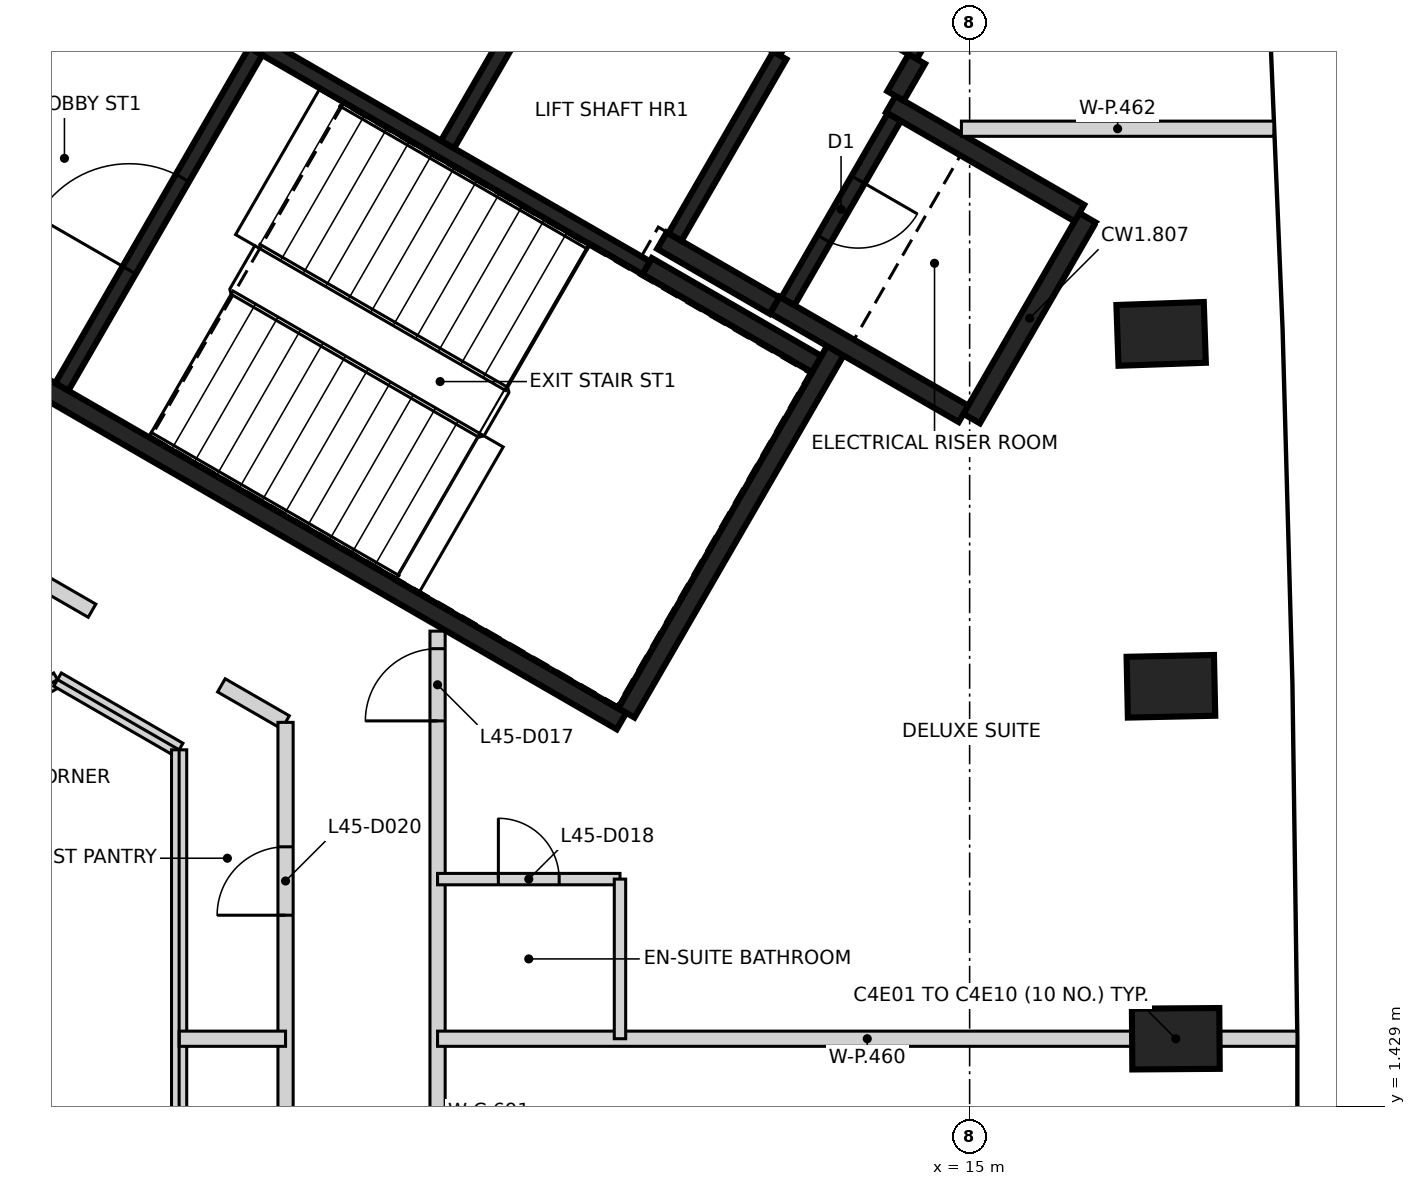
"""IFC4 building model, lengths in metres.
Left out: names, types, materials, properties, quantities, classifications, styles, units other than length and angle.
Written with IfcOpenShell. Run it as: python <this file> out.ifc"""

import sys

from ifc_helpers import new_model, si_unit, direction, frame, frame_2d, origin, origin_2d, place, context, subcontext, project, spatial, rectangle, extrude, element, fill, save


model = new_model("IFC4")
c1 = context("Model", 3, precision=1e-05, world=origin(), true_north=direction((0.0, 1.0)))
c2 = subcontext(c1, "Body", "Model", "MODEL_VIEW")
j1 = project(units=[si_unit("LENGTHUNIT", "METRE"), si_unit("PLANEANGLEUNIT", "RADIAN")], contexts=[c1])
p1 = place(None, origin())
s1 = spatial("IfcSite", under=j1, at=p1, CompositionType="ELEMENT")
p2 = place(p1, origin())
s2 = spatial("IfcBuilding", under=s1, at=p2, CompositionType="ELEMENT")
p3 = place(p2, frame((0.0, 0.0, 182.8)))
s3 = spatial("IfcBuildingStorey", under=s2, at=p3, CompositionType="ELEMENT", Elevation=182.8)
for number, where, z_axis, x_axis in (
    (1, (17.712, 2.319, -0.35), (0.0, 0.0, 1.0), (1.0, 0.007, 0.0)),
    (2, (17.648, 6.956, -0.35), (0.0, 0.0, 1.0), (1.0, 0.021, 0.0)),
    (3, (17.519, 11.592, -0.35), (0.0, 0.0, 1.0), (0.999, 0.034, 0.0)),
):
    element("IfcColumn", number, at=place(p3, frame(where, z_axis=z_axis, x_axis=x_axis)), inside=s3, PredefinedType="COLUMN", context=c2, shape_type="SweptSolid", body=[
        extrude(rectangle(XDim=1.15, YDim=0.8, at=origin_2d()), origin(), (0.0, 0.0, 1.0), 3.6),
    ])
p4 = place(p3, frame((10.42, 6.498, 0.0), z_axis=(0.0, 0.0, 1.0), x_axis=(-0.866021906294, 0.500006057782, 0.0)))
e4 = element("IfcWall", 4, at=p4, inside=s3, PredefinedType="SHEAR", context=c2, shape_type="SweptSolid", body=[
    extrude(rectangle(XDim=11.55, YDim=0.25, at=frame_2d((5.775, 0.0))), origin(), (0.0, 0.0, 1.0), 3.25),
])
p5 = place(p4, frame((10.025, 0.0, 0.0)))
e5 = element("IfcOpeningElement", 5, at=p5, cuts=e4, PredefinedType="OPENING", context=c2, shape_type="SweptSolid", body=[
    extrude(rectangle(XDim=1.2, YDim=2.1, at=frame_2d((0.6, 1.05))), frame((0.0, 0.135, 0.0), z_axis=(0.0, -1.0, 0.0), x_axis=(1.0, 0.0, 0.0)), (0.0, 0.0, 1.0), 0.27),
])
p6 = place(p4, frame((8.725, 0.0, 0.0)))
e6 = element("IfcOpeningElement", 6, at=p6, cuts=e4, PredefinedType="OPENING", context=c2, shape_type="SweptSolid", body=[
    extrude(rectangle(XDim=1.2, YDim=2.1, at=frame_2d((0.6, 1.05))), frame((0.0, 0.135, 0.0), z_axis=(0.0, -1.0, 0.0), x_axis=(1.0, 0.0, 0.0)), (0.0, 0.0, 1.0), 0.27),
])
p7 = place(p3, frame((0.48, 12.381, 0.0), z_axis=(0.0, 0.0, 1.0), x_axis=(0.49999885962, 0.866026062182, 0.0)))
e7 = element("IfcWall", 7, at=p7, inside=s3, PredefinedType="SHEAR", context=c2, shape_type="SweptSolid", body=[
    extrude(rectangle(XDim=5.225, YDim=0.25, at=frame_2d((2.612, 0.0))), origin(), (0.0, 0.0, 1.0), 3.25),
])
p8 = place(p3, frame((13.238, 11.378, 0.0), z_axis=(0.0, 0.0, 1.0), x_axis=(-0.500008851346, -0.866020293397, 0.0)))
e8 = element("IfcWall", 8, at=p8, inside=s3, PredefinedType="SHEAR", context=c2, shape_type="SweptSolid", body=[
    extrude(rectangle(XDim=5.51, YDim=0.25, at=frame_2d((2.755, 0.0))), origin(), (0.0, 0.0, 1.0), 3.25),
])
p9 = place(p3, frame((16.552, 13.119, 0.0), z_axis=(0.0, 0.0, 1.0), x_axis=(-0.499978833458, -0.866037623948, 0.0)))
e9 = element("IfcWall", 9, at=p9, inside=s3, PredefinedType="SHEAR", context=c2, shape_type="SweptSolid", body=[
    extrude(rectangle(XDim=3.05, YDim=0.25, at=frame_2d((1.525, 0.0))), origin(), (0.0, 0.0, 1.0), 3.25),
])
p10 = place(p3, frame((14.918, 10.54, 0.0), z_axis=(0.0, 0.0, 1.0), x_axis=(-0.866063538972, 0.499933942099, 0.0)))
e10 = element("IfcWall", 10, at=p10, inside=s3, PredefinedType="SHEAR", context=c2, shape_type="SweptSolid", body=[
    extrude(rectangle(XDim=2.865, YDim=0.25, at=frame_2d((1.432, 0.0))), origin(), (0.0, 0.0, 1.0), 3.25),
])
p11 = place(p3, frame((13.963, 14.614, 0.0), z_axis=(0.0, 0.0, 1.0), x_axis=(0.866042235819, -0.499970844928, 0.0)))
e11 = element("IfcWall", 11, at=p11, inside=s3, PredefinedType="SHEAR", context=c2, shape_type="SweptSolid", body=[
    extrude(rectangle(XDim=2.865, YDim=0.25, at=frame_2d((1.432, 0.0))), origin(), (0.0, 0.0, 1.0), 3.25),
])
p12 = place(p3, frame((10.757, 12.481, 0.0), z_axis=(0.0, 0.0, 1.0), x_axis=(0.866022940537, -0.500004266446, 0.0)))
e12 = element("IfcWall", 12, at=p12, inside=s3, PredefinedType="SHEAR", context=c2, shape_type="SweptSolid", body=[
    extrude(rectangle(XDim=2.575, YDim=0.25, at=frame_2d((1.287, 0.0))), origin(), (0.0, 0.0, 1.0), 3.25),
])
p13 = place(p3, frame((12.433, 11.964, 0.0), z_axis=(0.0, 0.0, 1.0), x_axis=(-0.866038183914, 0.499977863513, 0.0)))
e13 = element("IfcWall", 13, at=p13, inside=s3, PredefinedType="SHEAR", context=c2, shape_type="SweptSolid", body=[
    extrude(rectangle(XDim=1.71, YDim=0.25, at=frame_2d((0.855, 0.0))), origin(), (0.0, 0.0, 1.0), 3.25),
])
p14 = place(p3, frame((12.995, 16.108, 0.0), z_axis=(0.0, 0.0, 1.0), x_axis=(0.866044474677, -0.49996696679, 0.0)))
e14 = element("IfcWall", 14, at=p14, inside=s3, PredefinedType="SHEAR", context=c2, shape_type="SweptSolid", body=[
    extrude(rectangle(XDim=1.584, YDim=0.25, at=frame_2d((0.792, 0.0))), origin(), (0.0, 0.0, 1.0), 3.25),
])
p15 = place(p3, frame((14.305, 15.207, 0.0), z_axis=(0.0, 0.0, 1.0), x_axis=(-0.499848422343, -0.866112899501, 0.0)))
e15 = element("IfcWall", 15, at=p15, inside=s3, PredefinedType="SHEAR", context=c2, shape_type="SweptSolid", body=[
    extrude(rectangle(XDim=0.559, YDim=0.25, at=frame_2d((0.28, 0.0))), origin(), (0.0, 0.0, 1.0), 3.25),
])
p16 = place(p3, frame((12.552, 15.342, 0.0), z_axis=(0.0, 0.0, 1.0), x_axis=(-0.866030299012, 0.499991521122, 0.0)))
e16 = element("IfcWall", 16, at=p16, inside=s3, PredefinedType="SHEAR", context=c2, shape_type="SweptSolid", body=[
    extrude(rectangle(XDim=6.1, YDim=0.2, at=frame_2d((3.05, 0.0))), origin(), (0.0, 0.0, 1.0), 3.25),
])
p17 = place(p16, frame((1.0, 0.0, 0.0)))
e17 = element("IfcOpeningElement", 17, at=p17, cuts=e16, PredefinedType="OPENING", context=c2, shape_type="SweptSolid", body=[
    extrude(rectangle(XDim=1.2, YDim=2.1, at=frame_2d((0.6, 1.05))), frame((0.0, 0.11, 0.0), z_axis=(0.0, -1.0, 0.0), x_axis=(1.0, 0.0, 0.0)), (0.0, 0.0, 1.0), 0.22),
])
p18 = place(p16, frame((3.982, 0.0, 0.0)))
e18 = element("IfcOpeningElement", 18, at=p18, cuts=e16, PredefinedType="OPENING", context=c2, shape_type="SweptSolid", body=[
    extrude(rectangle(XDim=1.2, YDim=2.1, at=frame_2d((0.6, 1.05))), frame((0.0, 0.11, 0.0), z_axis=(0.0, -1.0, 0.0), x_axis=(1.0, 0.0, 0.0)), (0.0, 0.0, 1.0), 0.22),
])
p19 = place(p3, frame((10.743, 12.46, 0.0), z_axis=(0.0, 0.0, 1.0), x_axis=(-0.866018848283, 0.500011354289, 0.0)))
e19 = element("IfcWall", 19, at=p19, inside=s3, PredefinedType="SHEAR", context=c2, shape_type="SweptSolid", body=[
    extrude(rectangle(XDim=5.974, YDim=0.2, at=frame_2d((2.987, 0.0))), origin(), (0.0, 0.0, 1.0), 3.25),
])
p20 = place(p3, frame((3.057, 10.895, 0.0), z_axis=(0.0, 0.0, 1.0), x_axis=(0.500027839223, 0.866009330205, 0.0)))
e20 = element("IfcWall", 20, at=p20, inside=s3, PredefinedType="SHEAR", context=c2, shape_type="SweptSolid", body=[
    extrude(rectangle(XDim=5.098, YDim=0.2, at=frame_2d((2.549, 0.0))), origin(), (0.0, 0.0, 1.0), 3.25),
])
p21 = place(p20, frame((1.774, 0.0, 0.0)))
e21 = element("IfcOpeningElement", 21, at=p21, cuts=e20, PredefinedType="OPENING", context=c2, shape_type="SweptSolid", body=[
    extrude(rectangle(XDim=1.4, YDim=2.1, at=frame_2d((0.7, 1.05))), frame((0.0, 0.11, 0.0), z_axis=(0.0, -1.0, 0.0), x_axis=(1.0, 0.0, 0.0)), (0.0, 0.0, 1.0), 0.22),
])
p22 = place(p3, frame((8.132, 14.084, 0.0), z_axis=(0.0, 0.0, 1.0), x_axis=(0.500030834389, 0.86600760081, 0.0)))
e22 = element("IfcWall", 22, at=p22, inside=s3, PredefinedType="SHEAR", context=c2, shape_type="SweptSolid", body=[
    extrude(rectangle(XDim=3.198, YDim=0.2, at=frame_2d((1.599, 0.0))), origin(), (0.0, 0.0, 1.0), 3.25),
])
p23 = place(p3, frame((14.008, 14.442, 0.0), z_axis=(0.0, 0.0, 1.0), x_axis=(-0.499986818241, -0.866033014143, 0.0)))
e23 = element("IfcWall", 23, at=p23, inside=s3, PredefinedType="SHEAR", context=c2, shape_type="SweptSolid", body=[
    extrude(rectangle(XDim=2.798, YDim=0.2, at=frame_2d((1.399, 0.0))), origin(), (0.0, 0.0, 1.0), 3.25),
])
p24 = place(p23, frame((0.949, 0.0, 0.0)))
e24 = element("IfcOpeningElement", 24, at=p24, cuts=e23, PredefinedType="OPENING", context=c2, shape_type="SweptSolid", body=[
    extrude(rectangle(XDim=0.9, YDim=2.1, at=frame_2d((0.45, 1.05))), frame((0.0, 0.11, 0.0), z_axis=(0.0, -1.0, 0.0), x_axis=(1.0, 0.0, 0.0)), (0.0, 0.0, 1.0), 0.22),
])
p25 = place(p3, frame((12.502, 15.255, 0.0), z_axis=(0.0, 0.0, 1.0), x_axis=(-0.499965018551, -0.866045599391, 0.0)))
e25 = element("IfcWall", 25, at=p25, inside=s3, PredefinedType="SHEAR", context=c2, shape_type="SweptSolid", body=[
    extrude(rectangle(XDim=2.759, YDim=0.2, at=frame_2d((1.379, 0.0))), origin(), (0.0, 0.0, 1.0), 3.25),
])
p26 = place(p3, frame((-1.084, 12.65, 0.0), z_axis=(0.0, 0.0, 1.0), x_axis=(0.492271892014, 0.870441488173, 0.0)))
e26 = element("IfcWall", 26, at=p26, inside=s3, PredefinedType="PARTITIONING", context=c2, shape_type="SweptSolid", body=[
    extrude(rectangle(XDim=10.531, YDim=0.2, at=frame_2d((5.266, 0.0))), origin(), (0.0, 0.0, 1.0), 3.25),
])
p27 = place(p26, frame((4.161, 0.0, 0.0)))
e27 = element("IfcOpeningElement", 27, at=p27, cuts=e26, PredefinedType="OPENING", context=c2, shape_type="SweptSolid", body=[
    extrude(rectangle(XDim=0.95, YDim=2.1, at=frame_2d((0.475, 1.05))), frame((0.0, 0.11, 0.0), z_axis=(0.0, -1.0, 0.0), x_axis=(1.0, 0.0, 0.0)), (0.0, 0.0, 1.0), 0.22),
])
p28 = place(p3, frame((2.612, 8.436, 0.0), z_axis=(0.0, 0.0, 1.0), x_axis=(0.866055964107, -0.499947064232, 0.0)))
e28 = element("IfcWall", 28, at=p28, inside=s3, PredefinedType="PARTITIONING", context=c2, shape_type="SweptSolid", body=[
    extrude(rectangle(XDim=0.972, YDim=0.2, at=frame_2d((0.486, 0.0))), origin(), (0.0, 0.0, 1.0), 3.25),
])
p29 = place(p3, frame((5.156, 6.968, 0.0), z_axis=(0.0, 0.0, 1.0), x_axis=(0.866123013327, -0.49983089719, 0.0)))
e29 = element("IfcWall", 29, at=p29, inside=s3, PredefinedType="PARTITIONING", context=c2, shape_type="SweptSolid", body=[
    extrude(rectangle(XDim=0.974, YDim=0.2, at=frame_2d((0.487, 0.0))), origin(), (0.0, 0.0, 1.0), 3.25),
])
p30 = place(p3, frame((6.0, -6.481, 0.0), z_axis=(0.0, 0.0, 1.0), x_axis=(0.0, 1.0, 0.0)))
e30 = element("IfcWall", 30, at=p30, inside=s3, PredefinedType="PARTITIONING", context=c2, shape_type="SweptSolid", body=[
    extrude(rectangle(XDim=12.962, YDim=0.2, at=frame_2d((6.481, 0.0))), origin(), (0.0, 0.0, 1.0), 3.25),
])
p31 = place(p30, frame((3.956, 0.0, 0.0)))
e31 = element("IfcOpeningElement", 31, at=p31, cuts=e30, PredefinedType="OPENING", context=c2, shape_type="SweptSolid", body=[
    extrude(rectangle(XDim=0.9, YDim=2.1, at=frame_2d((0.45, 1.05))), frame((0.0, 0.11, 0.0), z_axis=(0.0, -1.0, 0.0), x_axis=(1.0, 0.0, 0.0)), (0.0, 0.0, 1.0), 0.22),
])
p32 = place(p30, frame((10.425, 0.0, 0.0)))
e32 = element("IfcOpeningElement", 32, at=p32, cuts=e30, PredefinedType="OPENING", context=c2, shape_type="SweptSolid", body=[
    extrude(rectangle(XDim=0.9, YDim=2.1, at=frame_2d((0.45, 1.05))), frame((0.0, 0.11, 0.0), z_axis=(0.0, -1.0, 0.0), x_axis=(1.0, 0.0, 0.0)), (0.0, 0.0, 1.0), 0.22),
])
p33 = place(p3, frame((8.0, -4.966, 0.0), z_axis=(0.0, 0.0, 1.0), x_axis=(0.0, 1.0, 0.0)))
e33 = element("IfcWall", 33, at=p33, inside=s3, PredefinedType="PARTITIONING", context=c2, shape_type="SweptSolid", body=[
    extrude(rectangle(XDim=12.647, YDim=0.2, at=frame_2d((6.324, 0.0))), origin(), (0.0, 0.0, 1.0), 3.25),
])
p34 = place(p33, frame((4.438, 0.0, 0.0)))
e34 = element("IfcOpeningElement", 34, at=p34, cuts=e33, PredefinedType="OPENING", context=c2, shape_type="SweptSolid", body=[
    extrude(rectangle(XDim=0.95, YDim=2.1, at=frame_2d((0.475, 1.05))), frame((0.0, 0.11, 0.0), z_axis=(0.0, -1.0, 0.0), x_axis=(1.0, 0.0, 0.0)), (0.0, 0.0, 1.0), 0.22),
])
p35 = place(p33, frame((11.466, 0.0, 0.0)))
e35 = element("IfcOpeningElement", 35, at=p35, cuts=e33, PredefinedType="OPENING", context=c2, shape_type="SweptSolid", body=[
    extrude(rectangle(XDim=0.95, YDim=2.1, at=frame_2d((0.475, 1.05))), frame((0.0, 0.11, 0.0), z_axis=(0.0, -1.0, 0.0), x_axis=(1.0, 0.0, 0.0)), (0.0, 0.0, 1.0), 0.22),
])
p36 = place(p3, frame((-7.6, 0.924, 0.0), z_axis=(0.0, 0.0, 1.0), x_axis=(0.866028806638, 0.499994106039, 0.0)))
e36 = element("IfcWall", 36, at=p36, inside=s3, PredefinedType="PARTITIONING", context=c2, shape_type="SweptSolid", body=[
    extrude(rectangle(XDim=12.24, YDim=0.2, at=frame_2d((6.12, 0.0))), origin(), (0.0, 0.0, 1.0), 3.25),
])
p37 = place(p3, frame((3.0, 7.044, 0.0), z_axis=(0.0, 0.0, 1.0), x_axis=(0.865875248522, -0.500259986404, 0.0)))
e37 = element("IfcWall", 37, at=p37, inside=s3, PredefinedType="PARTITIONING", context=c2, shape_type="SweptSolid", body=[
    extrude(rectangle(XDim=1.848, YDim=0.2, at=frame_2d((0.924, 0.0))), origin(), (0.0, 0.0, 1.0), 3.25),
])
p38 = place(p3, frame((4.6, -6.12, 0.0), z_axis=(0.0, 0.0, 1.0), x_axis=(0.0, 1.0, 0.0)))
e38 = element("IfcWall", 38, at=p38, inside=s3, PredefinedType="PARTITIONING", context=c2, shape_type="SweptSolid", body=[
    extrude(rectangle(XDim=12.24, YDim=0.2, at=frame_2d((6.12, 0.0))), origin(), (0.0, 0.0, 1.0), 3.25),
])
p39 = place(p3, frame((4.6, 2.319, 0.0), z_axis=(0.0, 0.0, 1.0), x_axis=(1.0, 0.0, 0.0)))
e39 = element("IfcWall", 39, at=p39, inside=s3, PredefinedType="PARTITIONING", context=c2, shape_type="SweptSolid", body=[
    extrude(rectangle(XDim=1.4, YDim=0.2, at=frame_2d((0.7, 0.0))), origin(), (0.0, 0.0, 1.0), 3.25),
])
p40 = place(p3, frame((8.0, 2.319, 0.0), z_axis=(0.0, 0.0, 1.0), x_axis=(1.0, 0.0, 0.0)))
e40 = element("IfcWall", 40, at=p40, inside=s3, PredefinedType="PARTITIONING", context=c2, shape_type="SweptSolid", body=[
    extrude(rectangle(XDim=11.306, YDim=0.2, at=frame_2d((5.653, 0.0))), origin(), (0.0, 0.0, 1.0), 3.25),
])
p41 = place(p3, frame((14.892, 14.291, 0.0), z_axis=(0.0, 0.0, 1.0), x_axis=(1.0, 0.0, 0.0)))
e41 = element("IfcWall", 41, at=p41, inside=s3, PredefinedType="PARTITIONING", context=c2, shape_type="SweptSolid", body=[
    extrude(rectangle(XDim=4.111, YDim=0.2, at=frame_2d((2.055, 0.0))), origin(), (0.0, 0.0, 1.0), 2.35),
])
p42 = place(p3, frame((8.0, 4.419, 0.0), z_axis=(0.0, 0.0, 1.0), x_axis=(1.0, 0.0, 0.0)))
e42 = element("IfcWall", 42, at=p42, inside=s3, PredefinedType="PARTITIONING", context=c2, shape_type="SweptSolid", body=[
    extrude(rectangle(XDim=2.4, YDim=0.15, at=frame_2d((1.2, 0.0))), origin(), (0.0, 0.0, 1.0), 3.25),
])
p43 = place(p42, frame((0.8, 0.0, 0.0)))
e43 = element("IfcOpeningElement", 43, at=p43, cuts=e42, PredefinedType="OPENING", context=c2, shape_type="SweptSolid", body=[
    extrude(rectangle(XDim=0.8, YDim=2.1, at=frame_2d((0.4, 1.05))), frame((0.0, 0.085, 0.0), z_axis=(0.0, -1.0, 0.0), x_axis=(1.0, 0.0, 0.0)), (0.0, 0.0, 1.0), 0.17),
])
p44 = place(p3, frame((10.4, 2.319, 0.0), z_axis=(0.0, 0.0, 1.0), x_axis=(0.0, 1.0, 0.0)))
e44 = element("IfcWall", 44, at=p44, inside=s3, PredefinedType="PARTITIONING", context=c2, shape_type="SweptSolid", body=[
    extrude(rectangle(XDim=2.1, YDim=0.15, at=frame_2d((1.05, 0.0))), origin(), (0.0, 0.0, 1.0), 3.25),
])
p45 = place(p21, origin())
e45 = element("IfcDoor", 45, at=p45, inside=s3, OperationType="SINGLE_SWING_RIGHT", PredefinedType="DOOR", context=c2, shape_type="SweptSolid", body=[
    extrude(rectangle(XDim=1.4, YDim=2.1, at=frame_2d((0.7, 1.05))), frame((0.0, 0.025, 0.0), z_axis=(0.0, -1.0, 0.0), x_axis=(1.0, 0.0, 0.0)), (0.0, 0.0, 1.0), 0.05),
])
fill(e21, e45)
p46 = place(p24, origin())
e46 = element("IfcDoor", 46, at=p46, inside=s3, OperationType="SINGLE_SWING_LEFT", PredefinedType="DOOR", context=c2, shape_type="SweptSolid", body=[
    extrude(rectangle(XDim=0.9, YDim=2.1, at=frame_2d((0.45, 1.05))), frame((0.0, 0.025, 0.0), z_axis=(0.0, -1.0, 0.0), x_axis=(1.0, 0.0, 0.0)), (0.0, 0.0, 1.0), 0.05),
])
fill(e24, e46)
p47 = place(p35, frame((0.95, 0.0, 0.0), z_axis=(0.0, 0.0, 1.0), x_axis=(-1.0, 0.0, 0.0)))
e47 = element("IfcDoor", 47, at=p47, inside=s3, OperationType="SINGLE_SWING_LEFT", PredefinedType="DOOR", context=c2, shape_type="SweptSolid", body=[
    extrude(rectangle(XDim=0.95, YDim=2.1, at=frame_2d((0.475, 1.05))), frame((0.0, 0.025, 0.0), z_axis=(0.0, -1.0, 0.0), x_axis=(1.0, 0.0, 0.0)), (0.0, 0.0, 1.0), 0.05),
])
fill(e35, e47)
p48 = place(p43, origin())
e48 = element("IfcDoor", 48, at=p48, inside=s3, OperationType="SINGLE_SWING_LEFT", PredefinedType="DOOR", context=c2, shape_type="SweptSolid", body=[
    extrude(rectangle(XDim=0.8, YDim=2.1, at=frame_2d((0.4, 1.05))), frame((0.0, 0.025, 0.0), z_axis=(0.0, -1.0, 0.0), x_axis=(1.0, 0.0, 0.0)), (0.0, 0.0, 1.0), 0.05),
])
fill(e43, e48)
p49 = place(p32, origin())
e49 = element("IfcDoor", 49, at=p49, inside=s3, OperationType="SINGLE_SWING_LEFT", PredefinedType="DOOR", context=c2, shape_type="SweptSolid", body=[
    extrude(rectangle(XDim=0.9, YDim=2.1, at=frame_2d((0.45, 1.05))), frame((0.0, 0.025, 0.0), z_axis=(0.0, -1.0, 0.0), x_axis=(1.0, 0.0, 0.0)), (0.0, 0.0, 1.0), 0.05),
])
fill(e32, e49)
save(model, sys.argv[1])
